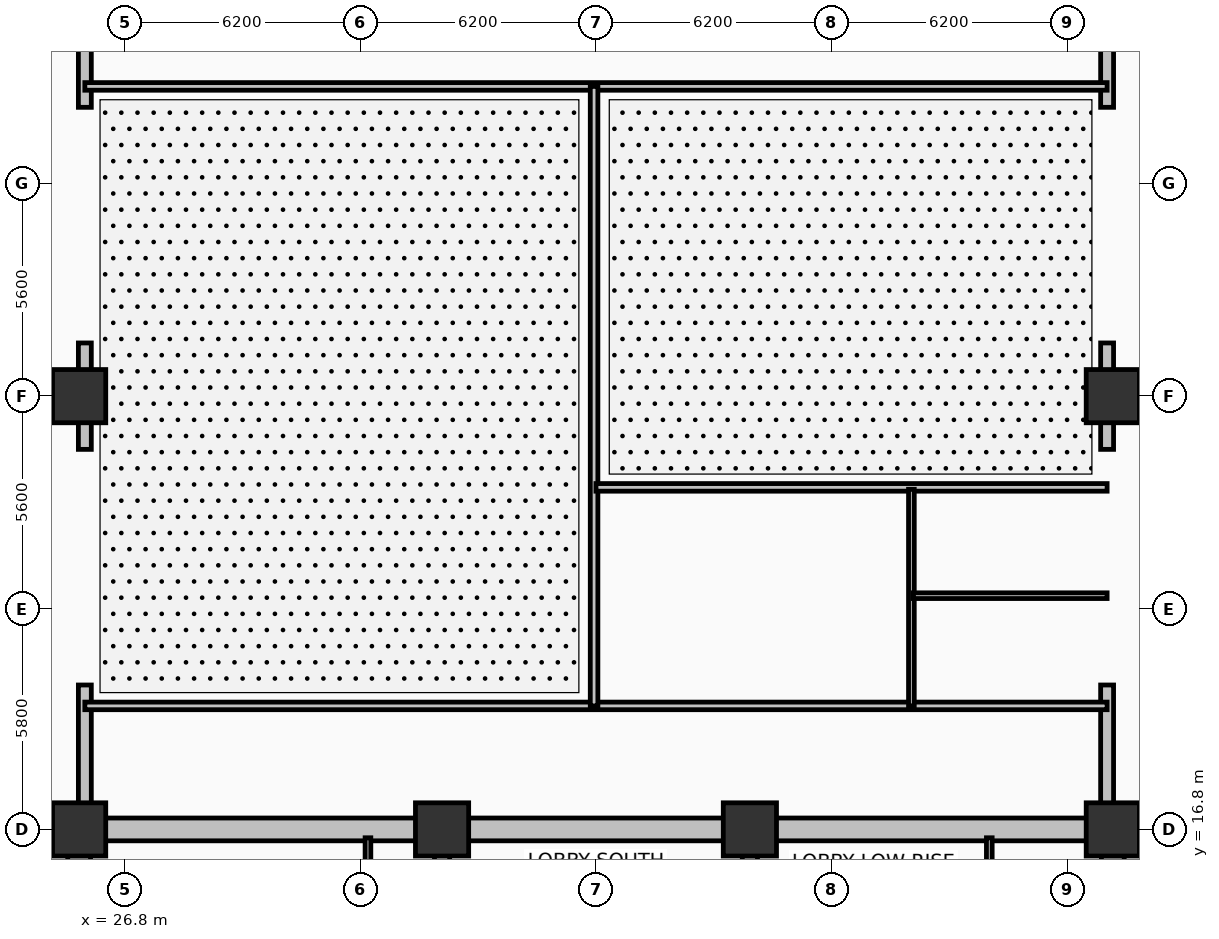
"""IFC4 building model, lengths in metres.
Left out: names, types, materials, properties, quantities, classifications, styles, units other than length and angle.
Written with IfcOpenShell. Run it as: python <this file> out.ifc"""

import sys

from ifc_helpers import new_model, si_unit, direction, frame, frame_2d, origin, origin_2d, place, context, subcontext, project, spatial, rectangle, extrude, element, fill, save


model = new_model("IFC4")
c1 = context("Model", 3, precision=1e-05, world=origin(), true_north=direction((0.0, 1.0)))
c2 = subcontext(c1, "Body", "Model", "MODEL_VIEW")
j1 = project(units=[si_unit("LENGTHUNIT", "METRE"), si_unit("PLANEANGLEUNIT", "RADIAN")], contexts=[c1])
p1 = place(None, origin())
s1 = spatial("IfcSite", under=j1, at=p1, CompositionType="ELEMENT")
p2 = place(p1, origin())
s2 = spatial("IfcBuilding", under=s1, at=p2, CompositionType="ELEMENT")
p3 = place(p2, origin())
s3 = spatial("IfcBuildingStorey", under=s2, at=p3, CompositionType="ELEMENT", Elevation=0.0)
for number, where, z_axis, x_axis in (
    (1, (25.6, 10.9, 0.0), (0.0, 0.0, 1.0), (0.0, 1.0, 0.0)),
    (2, (52.8, 10.9, 0.0), (0.0, 0.0, 1.0), (0.0, 1.0, 0.0)),
):
    element("IfcWall", number, at=place(p3, frame(where, z_axis=z_axis, x_axis=x_axis)), inside=s3, PredefinedType="SHEAR", context=c2, shape_type="SweptSolid", body=[
        extrude(rectangle(XDim=5.6, YDim=0.6, at=frame_2d((2.8, 0.0))), origin(), (0.0, 0.0, 1.0), 6.6),
    ])
p4 = place(p3, frame((25.6, 16.8, 0.0), z_axis=(0.0, 0.0, 1.0), x_axis=(1.0, 0.0, 0.0)))
e3 = element("IfcWall", 3, at=p4, inside=s3, PredefinedType="SHEAR", context=c2, shape_type="SweptSolid", body=[
    extrude(rectangle(XDim=27.2, YDim=0.6, at=frame_2d((13.6, 0.0))), origin(), (0.0, 0.0, 1.0), 6.6),
])
p5 = place(p4, frame((1.9, 0.0, 0.0)))
e4 = element("IfcOpeningElement", 4, at=p5, cuts=e3, PredefinedType="OPENING", context=c2, shape_type="SweptSolid", body=[
    extrude(rectangle(XDim=1.1, YDim=2.15, at=frame_2d((0.55, 1.075))), frame((0.0, 0.31, 0.0), z_axis=(0.0, -1.0, 0.0), x_axis=(1.0, 0.0, 0.0)), (0.0, 0.0, 1.0), 0.62),
])
p6 = place(p4, frame((13.0, 0.0, 0.0)))
e5 = element("IfcOpeningElement", 5, at=p6, cuts=e3, PredefinedType="OPENING", context=c2, shape_type="SweptSolid", body=[
    extrude(rectangle(XDim=1.2, YDim=2.15, at=frame_2d((0.6, 1.075))), frame((0.0, 0.31, 0.0), z_axis=(0.0, -1.0, 0.0), x_axis=(1.0, 0.0, 0.0)), (0.0, 0.0, 1.0), 0.62),
])
p7 = place(p4, frame((20.4, 0.0, 0.0)))
e6 = element("IfcOpeningElement", 6, at=p7, cuts=e3, PredefinedType="OPENING", context=c2, shape_type="SweptSolid", body=[
    extrude(rectangle(XDim=1.3, YDim=2.2, at=frame_2d((0.65, 1.1))), frame((0.0, 0.31, 0.0), z_axis=(0.0, -1.0, 0.0), x_axis=(1.0, 0.0, 0.0)), (0.0, 0.0, 1.0), 0.62),
])
p8 = place(p4, frame((24.65, 0.0, 0.0)))
e7 = element("IfcOpeningElement", 7, at=p8, cuts=e3, PredefinedType="OPENING", context=c2, shape_type="SweptSolid", body=[
    extrude(rectangle(XDim=0.85, YDim=2.1, at=frame_2d((0.425, 1.05))), frame((0.0, 0.31, 0.0), z_axis=(0.0, -1.0, 0.0), x_axis=(1.0, 0.0, 0.0)), (0.0, 0.0, 1.0), 0.62),
])
for number, where, z_axis, x_axis in (
    (8, (35.15, 10.9, 0.0), (0.0, 0.0, 1.0), (0.0, 1.0, 0.0)),
    (9, (43.25, 10.9, 0.0), (0.0, 0.0, 1.0), (0.0, 1.0, 0.0)),
):
    element("IfcWall", number, at=place(p3, frame(where, z_axis=z_axis, x_axis=x_axis)), inside=s3, PredefinedType="SHEAR", context=c2, shape_type="SweptSolid", body=[
        extrude(rectangle(XDim=5.6, YDim=0.4, at=frame_2d((2.8, 0.0))), origin(), (0.0, 0.0, 1.0), 6.6),
    ])
for number, where, z_axis, x_axis in (
    (10, (25.6, 16.8, 0.0), (0.0, 0.0, 1.0), (1.0, 0.0, 0.0)),
    (11, (35.15, 16.8, 0.0), (0.0, 0.0, 1.0), (1.0, 0.0, 0.0)),
    (12, (43.25, 16.8, 0.0), (0.0, 0.0, 1.0), (1.0, 0.0, 0.0)),
    (13, (52.8, 16.8, 0.0), (0.0, 0.0, 1.0), (1.0, 0.0, 0.0)),
    (14, (25.6, 28.2, 0.0), (0.0, 0.0, 1.0), (1.0, 0.0, 0.0)),
    (15, (52.8, 28.2, 0.0), (0.0, 0.0, 1.0), (1.0, 0.0, 0.0)),
):
    element("IfcColumn", number, at=place(p3, frame(where, z_axis=z_axis, x_axis=x_axis)), inside=s3, PredefinedType="COLUMN", context=c2, shape_type="SweptSolid", body=[
        extrude(rectangle(XDim=1.4, YDim=1.4, at=origin_2d()), origin(), (0.0, 0.0, 1.0), 6.6),
    ])
p9 = place(p3, frame((25.75, 17.15, 0.0), z_axis=(0.0, 0.0, 1.0), x_axis=(0.0, 1.0, 0.0)))
e16 = element("IfcWall", 16, at=p9, inside=s3, PredefinedType="SOLIDWALL", context=c2, shape_type="SweptSolid", body=[
    extrude(rectangle(XDim=3.45, YDim=0.34, at=frame_2d((1.725, 0.0))), origin(), (0.0, 0.0, 1.0), 5.58),
])
p10 = place(p9, frame((0.7, 0.0, 0.0)))
e17 = element("IfcOpeningElement", 17, at=p10, cuts=e16, PredefinedType="OPENING", context=c2, shape_type="SweptSolid", body=[
    extrude(rectangle(XDim=2.0, YDim=2.45, at=frame_2d((1.0, 1.225))), frame((0.0, 0.18, 0.0), z_axis=(0.0, -1.0, 0.0), x_axis=(1.0, 0.0, 0.0)), (0.0, 0.0, 1.0), 0.36),
])
p11 = place(p3, frame((25.75, 26.8, 0.0), z_axis=(0.0, 0.0, 1.0), x_axis=(0.0, 1.0, 0.0)))
e18 = element("IfcWall", 18, at=p11, inside=s3, PredefinedType="SOLIDWALL", context=c2, shape_type="SweptSolid", body=[
    extrude(rectangle(XDim=2.8, YDim=0.34, at=frame_2d((1.4, 0.0))), origin(), (0.0, 0.0, 1.0), 5.58),
])
p12 = place(p3, frame((25.75, 35.8, 0.0), z_axis=(0.0, 0.0, 1.0), x_axis=(0.0, 1.0, 0.0)))
e19 = element("IfcWall", 19, at=p12, inside=s3, PredefinedType="SOLIDWALL", context=c2, shape_type="SweptSolid", body=[
    extrude(rectangle(XDim=3.45, YDim=0.34, at=frame_2d((1.725, 0.0))), origin(), (0.0, 0.0, 1.0), 5.58),
])
p13 = place(p12, frame((0.7, 0.0, 0.0)))
e20 = element("IfcOpeningElement", 20, at=p13, cuts=e19, PredefinedType="OPENING", context=c2, shape_type="SweptSolid", body=[
    extrude(rectangle(XDim=2.0, YDim=2.45, at=frame_2d((1.0, 1.225))), frame((0.0, 0.18, 0.0), z_axis=(0.0, -1.0, 0.0), x_axis=(1.0, 0.0, 0.0)), (0.0, 0.0, 1.0), 0.36),
])
p14 = place(p3, frame((52.65, 17.15, 0.0), z_axis=(0.0, 0.0, 1.0), x_axis=(0.0, 1.0, 0.0)))
e21 = element("IfcWall", 21, at=p14, inside=s3, PredefinedType="SOLIDWALL", context=c2, shape_type="SweptSolid", body=[
    extrude(rectangle(XDim=3.45, YDim=0.34, at=frame_2d((1.725, 0.0))), origin(), (0.0, 0.0, 1.0), 5.58),
])
p15 = place(p14, frame((0.7, 0.0, 0.0)))
e22 = element("IfcOpeningElement", 22, at=p15, cuts=e21, PredefinedType="OPENING", context=c2, shape_type="SweptSolid", body=[
    extrude(rectangle(XDim=2.0, YDim=2.45, at=frame_2d((1.0, 1.225))), frame((0.0, 0.18, 0.0), z_axis=(0.0, -1.0, 0.0), x_axis=(1.0, 0.0, 0.0)), (0.0, 0.0, 1.0), 0.36),
])
p16 = place(p3, frame((52.65, 26.8, 0.0), z_axis=(0.0, 0.0, 1.0), x_axis=(0.0, 1.0, 0.0)))
e23 = element("IfcWall", 23, at=p16, inside=s3, PredefinedType="SOLIDWALL", context=c2, shape_type="SweptSolid", body=[
    extrude(rectangle(XDim=2.8, YDim=0.34, at=frame_2d((1.4, 0.0))), origin(), (0.0, 0.0, 1.0), 5.58),
])
p17 = place(p3, frame((52.65, 35.8, 0.0), z_axis=(0.0, 0.0, 1.0), x_axis=(0.0, 1.0, 0.0)))
e24 = element("IfcWall", 24, at=p17, inside=s3, PredefinedType="SOLIDWALL", context=c2, shape_type="SweptSolid", body=[
    extrude(rectangle(XDim=3.45, YDim=0.34, at=frame_2d((1.725, 0.0))), origin(), (0.0, 0.0, 1.0), 5.58),
])
p18 = place(p17, frame((0.7, 0.0, 0.0)))
e25 = element("IfcOpeningElement", 25, at=p18, cuts=e24, PredefinedType="OPENING", context=c2, shape_type="SweptSolid", body=[
    extrude(rectangle(XDim=2.0, YDim=2.45, at=frame_2d((1.0, 1.225))), frame((0.0, 0.18, 0.0), z_axis=(0.0, -1.0, 0.0), x_axis=(1.0, 0.0, 0.0)), (0.0, 0.0, 1.0), 0.36),
])
p19 = place(p3, frame((33.2, 14.5, 0.0), z_axis=(0.0, 0.0, 1.0), x_axis=(0.0, 1.0, 0.0)))
e26 = element("IfcWall", 26, at=p19, inside=s3, PredefinedType="PARTITIONING", context=c2, shape_type="SweptSolid", body=[
    extrude(rectangle(XDim=2.08, YDim=0.15, at=frame_2d((1.04, 0.0))), origin(), (0.0, 0.0, 1.0), 5.52),
])
p20 = place(p19, frame((0.55, 0.0, 0.0)))
e27 = element("IfcOpeningElement", 27, at=p20, cuts=e26, PredefinedType="OPENING", context=c2, shape_type="SweptSolid", body=[
    extrude(rectangle(XDim=0.85, YDim=2.05, at=frame_2d((0.425, 1.025))), frame((0.0, 0.085, 0.0), z_axis=(0.0, -1.0, 0.0), x_axis=(1.0, 0.0, 0.0)), (0.0, 0.0, 1.0), 0.17),
])
p21 = place(p3, frame((49.55, 13.7, 0.0), z_axis=(0.0, 0.0, 1.0), x_axis=(0.0, 1.0, 0.0)))
e28 = element("IfcWall", 28, at=p21, inside=s3, PredefinedType="PARTITIONING", context=c2, shape_type="SweptSolid", body=[
    extrude(rectangle(XDim=2.88, YDim=0.15, at=frame_2d((1.44, 0.0))), origin(), (0.0, 0.0, 1.0), 5.52),
])
p22 = place(p3, frame((25.75, 20.05, 0.0), z_axis=(0.0, 0.0, 1.0), x_axis=(1.0, 0.0, 0.0)))
e29 = element("IfcWall", 29, at=p22, inside=s3, PredefinedType="PARTITIONING", context=c2, shape_type="SweptSolid", body=[
    extrude(rectangle(XDim=26.9, YDim=0.2, at=frame_2d((13.45, 0.0))), origin(), (0.0, 0.0, 1.0), 5.52),
])
p23 = place(p22, frame((4.5, 0.0, 0.0)))
e30 = element("IfcOpeningElement", 30, at=p23, cuts=e29, PredefinedType="OPENING", context=c2, shape_type="SweptSolid", body=[
    extrude(rectangle(XDim=1.3, YDim=2.2, at=frame_2d((0.65, 1.1))), frame((0.0, 0.11, 0.0), z_axis=(0.0, -1.0, 0.0), x_axis=(1.0, 0.0, 0.0)), (0.0, 0.0, 1.0), 0.22),
])
p24 = place(p22, frame((15.6, 0.0, 0.0)))
e31 = element("IfcOpeningElement", 31, at=p24, cuts=e29, PredefinedType="OPENING", context=c2, shape_type="SweptSolid", body=[
    extrude(rectangle(XDim=1.1, YDim=2.15, at=frame_2d((0.55, 1.075))), frame((0.0, 0.11, 0.0), z_axis=(0.0, -1.0, 0.0), x_axis=(1.0, 0.0, 0.0)), (0.0, 0.0, 1.0), 0.22),
])
p25 = place(p22, frame((23.0, 0.0, 0.0)))
e32 = element("IfcOpeningElement", 32, at=p25, cuts=e29, PredefinedType="OPENING", context=c2, shape_type="SweptSolid", body=[
    extrude(rectangle(XDim=0.95, YDim=2.1, at=frame_2d((0.475, 1.05))), frame((0.0, 0.11, 0.0), z_axis=(0.0, -1.0, 0.0), x_axis=(1.0, 0.0, 0.0)), (0.0, 0.0, 1.0), 0.22),
])
p26 = place(p3, frame((52.65, 36.35, 0.0), z_axis=(0.0, 0.0, 1.0), x_axis=(-1.0, 0.0, 0.0)))
e33 = element("IfcWall", 33, at=p26, inside=s3, PredefinedType="PARTITIONING", context=c2, shape_type="SweptSolid", body=[
    extrude(rectangle(XDim=26.9, YDim=0.2, at=frame_2d((13.45, 0.0))), origin(), (0.0, 0.0, 1.0), 5.52),
])
p27 = place(p26, frame((4.5, 0.0, 0.0)))
e34 = element("IfcOpeningElement", 34, at=p27, cuts=e33, PredefinedType="OPENING", context=c2, shape_type="SweptSolid", body=[
    extrude(rectangle(XDim=1.3, YDim=2.2, at=frame_2d((0.65, 1.1))), frame((0.0, 0.11, 0.0), z_axis=(0.0, -1.0, 0.0), x_axis=(1.0, 0.0, 0.0)), (0.0, 0.0, 1.0), 0.22),
])
p28 = place(p26, frame((18.0, 0.0, 0.0)))
e35 = element("IfcOpeningElement", 35, at=p28, cuts=e33, PredefinedType="OPENING", context=c2, shape_type="SweptSolid", body=[
    extrude(rectangle(XDim=1.3, YDim=2.2, at=frame_2d((0.65, 1.1))), frame((0.0, 0.11, 0.0), z_axis=(0.0, -1.0, 0.0), x_axis=(1.0, 0.0, 0.0)), (0.0, 0.0, 1.0), 0.22),
])
p29 = place(p3, frame((39.15, 20.05, 0.0), z_axis=(0.0, 0.0, 1.0), x_axis=(0.0, 1.0, 0.0)))
e36 = element("IfcWall", 36, at=p29, inside=s3, PredefinedType="PARTITIONING", context=c2, shape_type="SweptSolid", body=[
    extrude(rectangle(XDim=16.3, YDim=0.2, at=frame_2d((8.15, 0.0))), origin(), (0.0, 0.0, 1.0), 5.52),
])
p30 = place(p3, frame((39.2, 25.8, 0.0), z_axis=(0.0, 0.0, 1.0), x_axis=(1.0, 0.0, 0.0)))
e37 = element("IfcWall", 37, at=p30, inside=s3, PredefinedType="PARTITIONING", context=c2, shape_type="SweptSolid", body=[
    extrude(rectangle(XDim=13.45, YDim=0.2, at=frame_2d((6.725, 0.0))), origin(), (0.0, 0.0, 1.0), 5.52),
])
p31 = place(p30, frame((9.6, 0.0, 0.0)))
e38 = element("IfcOpeningElement", 38, at=p31, cuts=e37, PredefinedType="OPENING", context=c2, shape_type="SweptSolid", body=[
    extrude(rectangle(XDim=1.0, YDim=2.15, at=frame_2d((0.5, 1.075))), frame((0.0, 0.11, 0.0), z_axis=(0.0, -1.0, 0.0), x_axis=(1.0, 0.0, 0.0)), (0.0, 0.0, 1.0), 0.22),
])
p32 = place(p3, frame((47.5, 20.05, 0.0), z_axis=(0.0, 0.0, 1.0), x_axis=(0.0, 1.0, 0.0)))
e39 = element("IfcWall", 39, at=p32, inside=s3, PredefinedType="PARTITIONING", context=c2, shape_type="SweptSolid", body=[
    extrude(rectangle(XDim=5.7, YDim=0.15, at=frame_2d((2.85, 0.0))), origin(), (0.0, 0.0, 1.0), 5.52),
])
p33 = place(p3, frame((47.55, 22.95, 0.0), z_axis=(0.0, 0.0, 1.0), x_axis=(1.0, 0.0, 0.0)))
e40 = element("IfcWall", 40, at=p33, inside=s3, PredefinedType="PARTITIONING", context=c2, shape_type="SweptSolid", body=[
    extrude(rectangle(XDim=5.1, YDim=0.15, at=frame_2d((2.55, 0.0))), origin(), (0.0, 0.0, 1.0), 5.52),
])
p34 = place(p10, origin())
e41 = element("IfcDoor", 41, at=p34, inside=s3, OperationType="DOUBLE_DOOR_SINGLE_SWING", PredefinedType="DOOR", context=c2, shape_type="SweptSolid", body=[
    extrude(rectangle(XDim=2.0, YDim=2.45, at=frame_2d((1.0, 1.225))), frame((0.0, 0.025, 0.0), z_axis=(0.0, -1.0, 0.0), x_axis=(1.0, 0.0, 0.0)), (0.0, 0.0, 1.0), 0.05),
])
fill(e17, e41)
p35 = place(p13, origin())
e42 = element("IfcDoor", 42, at=p35, inside=s3, OperationType="DOUBLE_DOOR_SINGLE_SWING", PredefinedType="DOOR", context=c2, shape_type="SweptSolid", body=[
    extrude(rectangle(XDim=2.0, YDim=2.45, at=frame_2d((1.0, 1.225))), frame((0.0, 0.025, 0.0), z_axis=(0.0, -1.0, 0.0), x_axis=(1.0, 0.0, 0.0)), (0.0, 0.0, 1.0), 0.05),
])
fill(e20, e42)
p36 = place(p15, origin())
e43 = element("IfcDoor", 43, at=p36, inside=s3, OperationType="DOUBLE_DOOR_SINGLE_SWING", PredefinedType="DOOR", context=c2, shape_type="SweptSolid", body=[
    extrude(rectangle(XDim=2.0, YDim=2.45, at=frame_2d((1.0, 1.225))), frame((0.0, 0.025, 0.0), z_axis=(0.0, -1.0, 0.0), x_axis=(1.0, 0.0, 0.0)), (0.0, 0.0, 1.0), 0.05),
])
fill(e22, e43)
p37 = place(p18, origin())
e44 = element("IfcDoor", 44, at=p37, inside=s3, OperationType="DOUBLE_DOOR_SINGLE_SWING", PredefinedType="DOOR", context=c2, shape_type="SweptSolid", body=[
    extrude(rectangle(XDim=2.0, YDim=2.45, at=frame_2d((1.0, 1.225))), frame((0.0, 0.025, 0.0), z_axis=(0.0, -1.0, 0.0), x_axis=(1.0, 0.0, 0.0)), (0.0, 0.0, 1.0), 0.05),
])
fill(e25, e44)
p38 = place(p23, origin())
e45 = element("IfcDoor", 45, at=p38, inside=s3, OperationType="SINGLE_SWING_LEFT", PredefinedType="DOOR", context=c2, shape_type="SweptSolid", body=[
    extrude(rectangle(XDim=1.3, YDim=2.2, at=frame_2d((0.65, 1.1))), frame((0.0, 0.025, 0.0), z_axis=(0.0, -1.0, 0.0), x_axis=(1.0, 0.0, 0.0)), (0.0, 0.0, 1.0), 0.05),
])
fill(e30, e45)
p39 = place(p24, origin())
e46 = element("IfcDoor", 46, at=p39, inside=s3, OperationType="SINGLE_SWING_RIGHT", PredefinedType="DOOR", context=c2, shape_type="SweptSolid", body=[
    extrude(rectangle(XDim=1.1, YDim=2.15, at=frame_2d((0.55, 1.075))), frame((0.0, 0.025, 0.0), z_axis=(0.0, -1.0, 0.0), x_axis=(1.0, 0.0, 0.0)), (0.0, 0.0, 1.0), 0.05),
])
fill(e31, e46)
p40 = place(p25, origin())
e47 = element("IfcDoor", 47, at=p40, inside=s3, OperationType="SINGLE_SWING_LEFT", PredefinedType="DOOR", context=c2, shape_type="SweptSolid", body=[
    extrude(rectangle(XDim=0.95, YDim=2.1, at=frame_2d((0.475, 1.05))), frame((0.0, 0.025, 0.0), z_axis=(0.0, -1.0, 0.0), x_axis=(1.0, 0.0, 0.0)), (0.0, 0.0, 1.0), 0.05),
])
fill(e32, e47)
p41 = place(p27, origin())
e48 = element("IfcDoor", 48, at=p41, inside=s3, OperationType="SINGLE_SWING_RIGHT", PredefinedType="DOOR", context=c2, shape_type="SweptSolid", body=[
    extrude(rectangle(XDim=1.3, YDim=2.2, at=frame_2d((0.65, 1.1))), frame((0.0, 0.025, 0.0), z_axis=(0.0, -1.0, 0.0), x_axis=(1.0, 0.0, 0.0)), (0.0, 0.0, 1.0), 0.05),
])
fill(e34, e48)
p42 = place(p28, origin())
e49 = element("IfcDoor", 49, at=p42, inside=s3, OperationType="SINGLE_SWING_LEFT", PredefinedType="DOOR", context=c2, shape_type="SweptSolid", body=[
    extrude(rectangle(XDim=1.3, YDim=2.2, at=frame_2d((0.65, 1.1))), frame((0.0, 0.025, 0.0), z_axis=(0.0, -1.0, 0.0), x_axis=(1.0, 0.0, 0.0)), (0.0, 0.0, 1.0), 0.05),
])
fill(e35, e49)
p43 = place(p31, origin())
e50 = element("IfcDoor", 50, at=p43, inside=s3, OperationType="SINGLE_SWING_LEFT", PredefinedType="DOOR", context=c2, shape_type="SweptSolid", body=[
    extrude(rectangle(XDim=1.0, YDim=2.15, at=frame_2d((0.5, 1.075))), frame((0.0, 0.025, 0.0), z_axis=(0.0, -1.0, 0.0), x_axis=(1.0, 0.0, 0.0)), (0.0, 0.0, 1.0), 0.05),
])
fill(e38, e50)
p44 = place(p5, origin())
e51 = element("IfcDoor", 51, at=p44, inside=s3, OperationType="SINGLE_SWING_RIGHT", PredefinedType="DOOR", context=c2, shape_type="SweptSolid", body=[
    extrude(rectangle(XDim=1.1, YDim=2.15, at=frame_2d((0.55, 1.075))), frame((0.0, 0.025, 0.0), z_axis=(0.0, -1.0, 0.0), x_axis=(1.0, 0.0, 0.0)), (0.0, 0.0, 1.0), 0.05),
])
fill(e4, e51)
p45 = place(p6, origin())
e52 = element("IfcDoor", 52, at=p45, inside=s3, OperationType="SINGLE_SWING_LEFT", PredefinedType="DOOR", context=c2, shape_type="SweptSolid", body=[
    extrude(rectangle(XDim=1.2, YDim=2.15, at=frame_2d((0.6, 1.075))), frame((0.0, 0.025, 0.0), z_axis=(0.0, -1.0, 0.0), x_axis=(1.0, 0.0, 0.0)), (0.0, 0.0, 1.0), 0.05),
])
fill(e5, e52)
p46 = place(p7, origin())
e53 = element("IfcDoor", 53, at=p46, inside=s3, OperationType="SINGLE_SWING_RIGHT", PredefinedType="DOOR", context=c2, shape_type="SweptSolid", body=[
    extrude(rectangle(XDim=1.3, YDim=2.2, at=frame_2d((0.65, 1.1))), frame((0.0, 0.025, 0.0), z_axis=(0.0, -1.0, 0.0), x_axis=(1.0, 0.0, 0.0)), (0.0, 0.0, 1.0), 0.05),
])
fill(e6, e53)
p47 = place(p8, origin())
e54 = element("IfcDoor", 54, at=p47, inside=s3, OperationType="SINGLE_SWING_LEFT", PredefinedType="DOOR", context=c2, shape_type="SweptSolid", body=[
    extrude(rectangle(XDim=0.85, YDim=2.1, at=frame_2d((0.425, 1.05))), frame((0.0, 0.025, 0.0), z_axis=(0.0, -1.0, 0.0), x_axis=(1.0, 0.0, 0.0)), (0.0, 0.0, 1.0), 0.05),
])
fill(e7, e54)
save(model, sys.argv[1])
